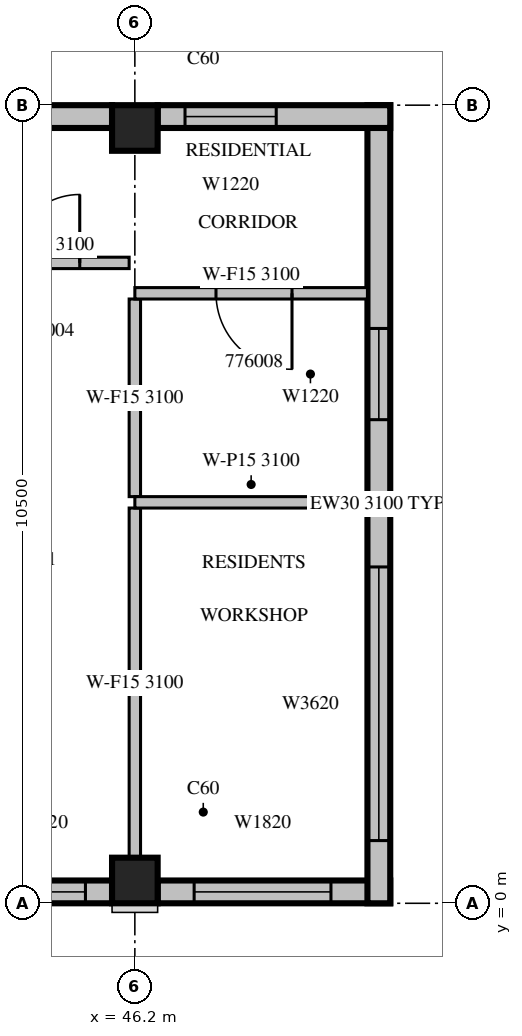
"""IFC4 building model, lengths in metres.
Left out: names, types, materials, properties, quantities, classifications, styles, units other than length and angle.
Written with IfcOpenShell. Run it as: python <this file> out.ifc"""

import sys

from ifc_helpers import new_model, si_unit, direction, frame, frame_2d, origin, origin_2d, place, context, subcontext, project, spatial, rectangle, extrude, source, transform, mapped, element, fill, save


model = new_model("IFC4")
c1 = context("Model", 3, precision=1e-05, world=origin(), true_north=direction((0.0, 1.0)))
c2 = subcontext(c1, "Body", "Model", "MODEL_VIEW")
j1 = project(units=[si_unit("LENGTHUNIT", "METRE"), si_unit("PLANEANGLEUNIT", "RADIAN")], contexts=[c1])
p1 = place(None, origin())
s1 = spatial("IfcSite", under=j1, at=p1, CompositionType="ELEMENT")
p2 = place(p1, origin())
s2 = spatial("IfcBuilding", under=s1, at=p2, CompositionType="ELEMENT")
p3 = place(p2, frame((0.0, 0.0, 326.5)))
s3 = spatial("IfcBuildingStorey", under=s2, at=p3, CompositionType="ELEMENT", Elevation=326.5)
m1 = source(origin(), c2, "Body", "SweptSolid", [
    extrude(rectangle(XDim=0.6, YDim=0.6, at=origin_2d()), origin(), (0.0, 0.0, 1.0), 3.5),
])
for number, where, z_axis, x_axis in (
    (1, (46.2, 0.3, 0.0), (0.0, 0.0, 1.0), (1.0, 0.0, 0.0)),
    (2, (46.2, 10.2, 0.0), (0.0, 0.0, 1.0), (1.0, 0.0, 0.0)),
):
    element("IfcColumn", number, at=place(p3, frame(where, z_axis=z_axis, x_axis=x_axis)), inside=s3, PredefinedType="COLUMN", context=c2, shape_type="MappedRepresentation", body=[
        mapped(m1, transform((0.0, 0.0, 0.0), scale=1.0)),
    ])
m2 = source(origin(), c2, "Body", "SweptSolid", [
    extrude(rectangle(XDim=1.9, YDim=0.3, at=frame_2d((0.95, 0.0))), origin(), (0.0, 0.0, 1.0), 3.1),
])
p4 = place(p3, frame((44.0, 0.15, 0.0), z_axis=(0.0, 0.0, 1.0), x_axis=(1.0, 0.0, 0.0)))
e3 = element("IfcWall", 3, at=p4, inside=s3, PredefinedType="STANDARD", context=c2, shape_type="MappedRepresentation", body=[
    mapped(m2, transform((0.0, 0.0, 0.0), scale=1.0)),
])
m3 = source(origin(), c2, "Body", "SweptSolid", [
    extrude(rectangle(XDim=1.2, YDim=2.0, at=frame_2d((0.6, 1.0))), frame((0.0, 0.16, 0.0), z_axis=(0.0, -1.0, 0.0), x_axis=(1.0, 0.0, 0.0)), (0.0, 0.0, 1.0), 0.32),
])
p5 = place(p4, frame((0.35, 0.0, 0.6)))
e4 = element("IfcOpeningElement", 4, at=p5, cuts=e3, PredefinedType="OPENING", context=c2, shape_type="MappedRepresentation", body=[
    mapped(m3, transform((0.0, 0.0, 0.0), scale=1.0)),
])
p6 = place(p3, frame((46.5, 0.15, 0.0), z_axis=(0.0, 0.0, 1.0), x_axis=(1.0, 0.0, 0.0)))
e5 = element("IfcWall", 5, at=p6, inside=s3, PredefinedType="STANDARD", context=c2, shape_type="SweptSolid", body=[
    extrude(rectangle(XDim=3.06, YDim=0.3, at=frame_2d((1.53, 0.0))), origin(), (0.0, 0.0, 1.0), 3.1),
])
m4 = source(origin(), c2, "Body", "SweptSolid", [
    extrude(rectangle(XDim=1.8, YDim=2.0, at=frame_2d((0.9, 1.0))), frame((0.0, 0.16, 0.0), z_axis=(0.0, -1.0, 0.0), x_axis=(1.0, 0.0, 0.0)), (0.0, 0.0, 1.0), 0.32),
])
p7 = place(p6, frame((0.48, 0.0, 0.6)))
e6 = element("IfcOpeningElement", 6, at=p7, cuts=e5, PredefinedType="OPENING", context=c2, shape_type="MappedRepresentation", body=[
    mapped(m4, transform((0.0, 0.0, 0.0), scale=1.0)),
])
m5 = source(origin(), c2, "Body", "SweptSolid", [
    extrude(rectangle(XDim=10.5, YDim=0.3, at=frame_2d((5.25, 0.0))), origin(), (0.0, 0.0, 1.0), 3.1),
])
p8 = place(p3, frame((49.41, 0.0, 0.0), z_axis=(0.0, 0.0, 1.0), x_axis=(0.0, 1.0, 0.0)))
e7 = element("IfcWall", 7, at=p8, inside=s3, PredefinedType="STANDARD", context=c2, shape_type="MappedRepresentation", body=[
    mapped(m5, transform((0.0, 0.0, 0.0), scale=1.0)),
])
m6 = source(origin(), c2, "Body", "SweptSolid", [
    extrude(rectangle(XDim=3.6, YDim=2.0, at=frame_2d((1.8, 1.0))), frame((0.0, 0.16, 0.0), z_axis=(0.0, -1.0, 0.0), x_axis=(1.0, 0.0, 0.0)), (0.0, 0.0, 1.0), 0.32),
])
p9 = place(p8, frame((0.825, 0.0, 0.6)))
e8 = element("IfcOpeningElement", 8, at=p9, cuts=e7, PredefinedType="OPENING", context=c2, shape_type="MappedRepresentation", body=[
    mapped(m6, transform((0.0, 0.0, 0.0), scale=1.0)),
])
p10 = place(p8, frame((6.362, 0.0, 0.6)))
e9 = element("IfcOpeningElement", 9, at=p10, cuts=e7, PredefinedType="OPENING", context=c2, shape_type="MappedRepresentation", body=[
    mapped(m3, transform((0.0, 0.0, 0.0), scale=1.0)),
])
m7 = source(origin(), c2, "Body", "SweptSolid", [
    extrude(rectangle(XDim=3.06, YDim=0.3, at=frame_2d((1.53, 0.0))), origin(), (0.0, 0.0, 1.0), 3.1),
])
p11 = place(p3, frame((49.56, 10.35, 0.0), z_axis=(0.0, 0.0, 1.0), x_axis=(-1.0, 0.0, 0.0)))
e10 = element("IfcWall", 10, at=p11, inside=s3, PredefinedType="STANDARD", context=c2, shape_type="MappedRepresentation", body=[
    mapped(m7, transform((0.0, 0.0, 0.0), scale=1.0)),
])
p12 = place(p11, frame((1.5, 0.0, 0.6)))
e11 = element("IfcOpeningElement", 11, at=p12, cuts=e10, PredefinedType="OPENING", context=c2, shape_type="MappedRepresentation", body=[
    mapped(m3, transform((0.0, 0.0, 0.0), scale=1.0)),
])
m8 = source(origin(), c2, "Body", "SweptSolid", [
    extrude(rectangle(XDim=7.8, YDim=0.3, at=frame_2d((3.9, 0.0))), origin(), (0.0, 0.0, 1.0), 3.1),
])
p13 = place(p3, frame((45.9, 10.35, 0.0), z_axis=(0.0, 0.0, 1.0), x_axis=(-1.0, 0.0, 0.0)))
e12 = element("IfcWall", 12, at=p13, inside=s3, PredefinedType="STANDARD", context=c2, shape_type="MappedRepresentation", body=[
    mapped(m8, transform((0.0, 0.0, 0.0), scale=1.0)),
])
m9 = source(origin(), c2, "Body", "SweptSolid", [
    extrude(rectangle(XDim=3.0, YDim=2.0, at=frame_2d((1.5, 1.0))), frame((0.0, 0.16, 0.0), z_axis=(0.0, -1.0, 0.0), x_axis=(1.0, 0.0, 0.0)), (0.0, 0.0, 1.0), 0.32),
])
p14 = place(p13, frame((1.14, 0.0, 0.6)))
e13 = element("IfcOpeningElement", 13, at=p14, cuts=e12, PredefinedType="OPENING", context=c2, shape_type="MappedRepresentation", body=[
    mapped(m9, transform((0.0, 0.0, 0.0), scale=1.0)),
])
p15 = place(p13, frame((6.24, 0.0, 0.6)))
e14 = element("IfcOpeningElement", 14, at=p15, cuts=e12, PredefinedType="OPENING", context=c2, shape_type="MappedRepresentation", body=[
    mapped(m3, transform((0.0, 0.0, 0.0), scale=1.0)),
])
m10 = source(origin(), c2, "Body", "SweptSolid", [
    extrude(rectangle(XDim=2.2, YDim=0.15, at=frame_2d((1.1, 0.0))), origin(), (0.0, 0.0, 1.0), 3.1),
])
p16 = place(p3, frame((46.125, 8.425, 0.0), z_axis=(0.0, 0.0, 1.0), x_axis=(-1.0, 0.0, 0.0)))
e15 = element("IfcWall", 15, at=p16, inside=s3, PredefinedType="PARTITIONING", context=c2, shape_type="MappedRepresentation", body=[
    mapped(m10, transform((0.0, 0.0, 0.0), scale=1.0)),
])
m11 = source(origin(), c2, "Body", "SweptSolid", [
    extrude(rectangle(XDim=0.9, YDim=2.1, at=frame_2d((0.45, 1.05))), frame((0.0, 0.085, 0.0), z_axis=(0.0, -1.0, 0.0), x_axis=(1.0, 0.0, 0.0)), (0.0, 0.0, 1.0), 0.17),
])
p17 = place(p16, frame((0.65, 0.0, 0.0)))
e16 = element("IfcOpeningElement", 16, at=p17, cuts=e15, PredefinedType="OPENING", context=c2, shape_type="MappedRepresentation", body=[
    mapped(m11, transform((0.0, 0.0, 0.0), scale=1.0)),
])
m12 = source(origin(), c2, "Body", "SweptSolid", [
    extrude(rectangle(XDim=4.601, YDim=0.15, at=frame_2d((2.3, 0.0))), origin(), (0.0, 0.0, 1.0), 3.1),
])
p18 = place(p3, frame((46.2, 0.599, 0.0), z_axis=(0.0, 0.0, 1.0), x_axis=(0.0, 1.0, 0.0)))
e17 = element("IfcWall", 17, at=p18, inside=s3, PredefinedType="PARTITIONING", context=c2, shape_type="MappedRepresentation", body=[
    mapped(m12, transform((0.0, 0.0, 0.0), scale=1.0)),
])
m13 = source(origin(), c2, "Body", "SweptSolid", [
    extrude(rectangle(XDim=2.6, YDim=0.15, at=frame_2d((1.3, 0.0))), origin(), (0.0, 0.0, 1.0), 3.1),
])
p19 = place(p3, frame((46.2, 5.35, 0.0), z_axis=(0.0, 0.0, 1.0), x_axis=(0.0, 1.0, 0.0)))
e18 = element("IfcWall", 18, at=p19, inside=s3, PredefinedType="PARTITIONING", context=c2, shape_type="MappedRepresentation", body=[
    mapped(m13, transform((0.0, 0.0, 0.0), scale=1.0)),
])
m14 = source(origin(), c2, "Body", "SweptSolid", [
    extrude(rectangle(XDim=3.06, YDim=0.15, at=frame_2d((1.53, 0.0))), origin(), (0.0, 0.0, 1.0), 3.1),
])
p20 = place(p3, frame((49.26, 5.275, 0.0), z_axis=(0.0, 0.0, 1.0), x_axis=(-1.0, 0.0, 0.0)))
e19 = element("IfcWall", 19, at=p20, inside=s3, PredefinedType="PARTITIONING", context=c2, shape_type="MappedRepresentation", body=[
    mapped(m14, transform((0.0, 0.0, 0.0), scale=1.0)),
])
p21 = place(p3, frame((49.26, 8.025, 0.0), z_axis=(0.0, 0.0, 1.0), x_axis=(-1.0, 0.0, 0.0)))
e20 = element("IfcWall", 20, at=p21, inside=s3, PredefinedType="PARTITIONING", context=c2, shape_type="MappedRepresentation", body=[
    mapped(m14, transform((0.0, 0.0, 0.0), scale=1.0)),
])
m15 = source(origin(), c2, "Body", "SweptSolid", [
    extrude(rectangle(XDim=1.0, YDim=2.1, at=frame_2d((0.5, 1.05))), frame((0.0, 0.085, 0.0), z_axis=(0.0, -1.0, 0.0), x_axis=(1.0, 0.0, 0.0)), (0.0, 0.0, 1.0), 0.17),
])
p22 = place(p21, frame((0.993, 0.0, 0.0)))
e21 = element("IfcOpeningElement", 21, at=p22, cuts=e20, PredefinedType="OPENING", context=c2, shape_type="MappedRepresentation", body=[
    mapped(m15, transform((0.0, 0.0, 0.0), scale=1.0)),
])
m16 = source(origin(), c2, "Body", "SweptSolid", [
    extrude(rectangle(XDim=1.2, YDim=2.0, at=frame_2d((0.6, 1.0))), frame((0.0, 0.03, 0.0), z_axis=(0.0, -1.0, 0.0), x_axis=(1.0, 0.0, 0.0)), (0.0, 0.0, 1.0), 0.06),
])
p23 = place(p5, origin())
e22 = element("IfcWindow", 22, at=p23, inside=s3, PartitioningType="SINGLE_PANEL", PredefinedType="WINDOW", context=c2, shape_type="MappedRepresentation", body=[
    mapped(m16, transform((0.0, 0.0, 0.0), scale=1.0)),
])
fill(e4, e22)
m17 = source(origin(), c2, "Body", "SweptSolid", [
    extrude(rectangle(XDim=1.8, YDim=2.0, at=frame_2d((0.9, 1.0))), frame((0.0, 0.03, 0.0), z_axis=(0.0, -1.0, 0.0), x_axis=(1.0, 0.0, 0.0)), (0.0, 0.0, 1.0), 0.06),
])
p24 = place(p7, origin())
e23 = element("IfcWindow", 23, at=p24, inside=s3, PartitioningType="SINGLE_PANEL", PredefinedType="WINDOW", context=c2, shape_type="MappedRepresentation", body=[
    mapped(m17, transform((0.0, 0.0, 0.0), scale=1.0)),
])
fill(e6, e23)
m18 = source(origin(), c2, "Body", "SweptSolid", [
    extrude(rectangle(XDim=3.6, YDim=2.0, at=frame_2d((1.8, 1.0))), frame((0.0, 0.03, 0.0), z_axis=(0.0, -1.0, 0.0), x_axis=(1.0, 0.0, 0.0)), (0.0, 0.0, 1.0), 0.06),
])
p25 = place(p9, origin())
e24 = element("IfcWindow", 24, at=p25, inside=s3, PartitioningType="SINGLE_PANEL", PredefinedType="WINDOW", context=c2, shape_type="MappedRepresentation", body=[
    mapped(m18, transform((0.0, 0.0, 0.0), scale=1.0)),
])
fill(e8, e24)
p26 = place(p10, origin())
e25 = element("IfcWindow", 25, at=p26, inside=s3, PartitioningType="SINGLE_PANEL", PredefinedType="WINDOW", context=c2, shape_type="MappedRepresentation", body=[
    mapped(m16, transform((0.0, 0.0, 0.0), scale=1.0)),
])
fill(e9, e25)
p27 = place(p12, origin())
e26 = element("IfcWindow", 26, at=p27, inside=s3, PartitioningType="SINGLE_PANEL", PredefinedType="WINDOW", context=c2, shape_type="MappedRepresentation", body=[
    mapped(m16, transform((0.0, 0.0, 0.0), scale=1.0)),
])
fill(e11, e26)
m19 = source(origin(), c2, "Body", "SweptSolid", [
    extrude(rectangle(XDim=0.9, YDim=2.1, at=frame_2d((0.45, 1.05))), frame((0.0, 0.025, 0.0), z_axis=(0.0, -1.0, 0.0), x_axis=(1.0, 0.0, 0.0)), (0.0, 0.0, 1.0), 0.05),
])
p28 = place(p17, origin())
e27 = element("IfcDoor", 27, at=p28, inside=s3, OperationType="SINGLE_SWING_RIGHT", PredefinedType="DOOR", context=c2, shape_type="MappedRepresentation", body=[
    mapped(m19, transform((0.0, 0.0, 0.0), scale=1.0)),
])
fill(e16, e27)
m20 = source(origin(), c2, "Body", "SweptSolid", [
    extrude(rectangle(XDim=1.0, YDim=2.1, at=frame_2d((0.5, 1.05))), frame((0.0, 0.025, 0.0), z_axis=(0.0, -1.0, 0.0), x_axis=(1.0, 0.0, 0.0)), (0.0, 0.0, 1.0), 0.05),
])
p29 = place(p22, origin())
e28 = element("IfcDoor", 28, at=p29, inside=s3, OperationType="SINGLE_SWING_LEFT", PredefinedType="DOOR", context=c2, shape_type="MappedRepresentation", body=[
    mapped(m20, transform((0.0, 0.0, 0.0), scale=1.0)),
])
fill(e21, e28)
save(model, sys.argv[1])
